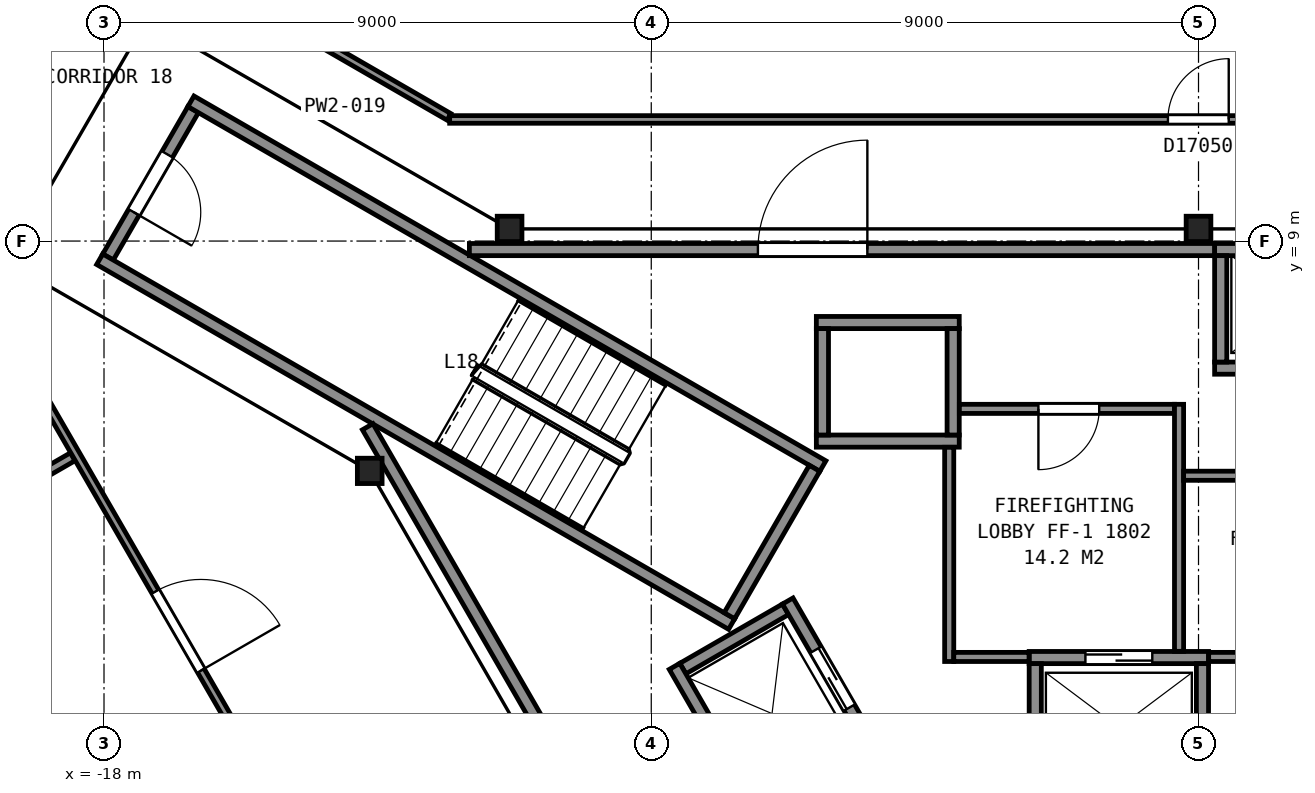
"""IFC4 building model, lengths in metres.
Left out: names, types, materials, properties, quantities, classifications, styles, units other than length and angle.
Written with IfcOpenShell. Run it as: python <this file> out.ifc"""

import sys

from ifc_helpers import new_model, si_unit, direction, frame, frame_2d, origin, origin_2d, place, context, subcontext, project, spatial, rectangle, i_section, extrude, element, fill, save


model = new_model("IFC4")
c1 = context("Model", 3, precision=1e-05, world=origin(), true_north=direction((0.0, 1.0)))
c2 = subcontext(c1, "Body", "Model", "MODEL_VIEW")
j1 = project(units=[si_unit("LENGTHUNIT", "METRE"), si_unit("PLANEANGLEUNIT", "RADIAN")], contexts=[c1])
p1 = place(None, origin())
s1 = spatial("IfcSite", under=j1, at=p1, CompositionType="ELEMENT")
p2 = place(p1, origin())
s2 = spatial("IfcBuilding", under=s1, at=p2, CompositionType="ELEMENT")
p3 = place(p2, frame((0.0, 0.0, 80.0)))
s3 = spatial("IfcBuildingStorey", under=s2, at=p3, CompositionType="ELEMENT", Elevation=80.0)
for number, where, z_axis, x_axis in (
    (1, (0.0, 9.2, 0.0), (0.0, 0.0, 1.0), (1.0, 0.0, 0.0)),
    (2, (-11.33, 9.2, 0.0), (0.0, 0.0, 1.0), (1.0, 0.0, 0.0)),
    (3, (-13.63, 5.22, 0.0), (0.0, 0.0, 1.0), (1.0, 0.0, 0.0)),
):
    element("IfcColumn", number, at=place(p3, frame(where, z_axis=z_axis, x_axis=x_axis)), inside=s3, PredefinedType="COLUMN", context=c2, shape_type="SweptSolid", body=[
        extrude(i_section(OverallWidth=0.406, OverallDepth=0.417, WebThickness=0.03, FlangeThickness=0.048, FilletRadius=0.015, at=origin_2d()), origin(), (0.0, 0.0, 1.0), 3.6),
    ])
p4 = place(p3, frame((-16.534, 11.162, 0.0), z_axis=(0.0, 0.0, 1.0), x_axis=(-0.49998411664, -0.866034573852, 0.0)))
e4 = element("IfcWall", 4, at=p4, inside=s3, PredefinedType="PARTITIONING", context=c2, shape_type="SweptSolid", body=[
    extrude(rectangle(XDim=2.8, YDim=0.2, at=frame_2d((1.4, 0.0))), origin(), (0.0, 0.0, 1.0), 3.35),
])
p5 = place(p4, frame((0.85, 0.0, 0.0)))
e5 = element("IfcOpeningElement", 5, at=p5, cuts=e4, PredefinedType="OPENING", context=c2, shape_type="SweptSolid", body=[
    extrude(rectangle(XDim=1.1, YDim=2.1, at=frame_2d((0.55, 1.05))), frame((0.0, 0.11, 0.0), z_axis=(0.0, -1.0, 0.0), x_axis=(1.0, 0.0, 0.0)), (0.0, 0.0, 1.0), 0.22),
])
for number, where, z_axis, x_axis in (
    (6, (-7.678, 2.701, 0.0), (0.0, 0.0, 1.0), (-0.866, 0.5, 0.0)),
    (7, (-6.178, 5.299, 0.0), (0.0, 0.0, 1.0), (-0.866, 0.5, 0.0)),
):
    element("IfcWall", number, at=place(p3, frame(where, z_axis=z_axis, x_axis=x_axis)), inside=s3, PredefinedType="PARTITIONING", context=c2, shape_type="SweptSolid", body=[
        extrude(rectangle(XDim=12.0, YDim=0.2, at=frame_2d((6.0, 0.0))), origin(), (0.0, 0.0, 1.0), 3.35),
    ])
p6 = place(p3, frame((-6.315, 5.262, 0.0), z_axis=(0.0, 0.0, 1.0), x_axis=(-0.500049511043, -0.865996816683, 0.0)))
e8 = element("IfcWall", 8, at=p6, inside=s3, PredefinedType="PARTITIONING", context=c2, shape_type="SweptSolid", body=[
    extrude(rectangle(XDim=2.8, YDim=0.2, at=frame_2d((1.4, 0.0))), origin(), (0.0, 0.0, 1.0), 3.35),
])
p7 = place(p3, frame((-2.785, 2.15, 0.0), z_axis=(0.0, 0.0, 1.0), x_axis=(1.0, 0.0, 0.0)))
e9 = element("IfcWall", 9, at=p7, inside=s3, PredefinedType="PARTITIONING", context=c2, shape_type="SweptSolid", body=[
    extrude(rectangle(XDim=2.95, YDim=0.2, at=frame_2d((1.475, 0.0))), origin(), (0.0, 0.0, 1.0), 3.6),
])
p8 = place(p7, frame((0.925, 0.0, 0.0)))
e10 = element("IfcOpeningElement", 10, at=p8, cuts=e9, PredefinedType="OPENING", context=c2, shape_type="SweptSolid", body=[
    extrude(rectangle(XDim=1.1, YDim=2.1, at=frame_2d((0.55, 1.05))), frame((0.0, 0.11, 0.0), z_axis=(0.0, -1.0, 0.0), x_axis=(1.0, 0.0, 0.0)), (0.0, 0.0, 1.0), 0.22),
])
p9 = place(p3, frame((-6.285, 5.71, 0.0), z_axis=(0.0, 0.0, 1.0), x_axis=(1.0, 0.0, 0.0)))
e11 = element("IfcWall", 11, at=p9, inside=s3, PredefinedType="PARTITIONING", context=c2, shape_type="SweptSolid", body=[
    extrude(rectangle(XDim=2.35, YDim=0.2, at=frame_2d((1.175, 0.0))), origin(), (0.0, 0.0, 1.0), 3.6),
])
p10 = place(p3, frame((0.265, 6.91, 0.0), z_axis=(0.0, 0.0, 1.0), x_axis=(1.0, 0.0, 0.0)))
e12 = element("IfcWall", 12, at=p10, inside=s3, PredefinedType="PARTITIONING", context=c2, shape_type="SweptSolid", body=[
    extrude(rectangle(XDim=2.55, YDim=0.2, at=frame_2d((1.275, 0.0))), origin(), (0.0, 0.0, 1.0), 3.6),
])
p11 = place(p10, frame((0.725, 0.0, 0.0)))
e13 = element("IfcOpeningElement", 13, at=p11, cuts=e12, PredefinedType="OPENING", context=c2, shape_type="SweptSolid", body=[
    extrude(rectangle(XDim=1.1, YDim=2.1, at=frame_2d((0.55, 1.05))), frame((0.0, 0.11, 0.0), z_axis=(0.0, -1.0, 0.0), x_axis=(1.0, 0.0, 0.0)), (0.0, 0.0, 1.0), 0.22),
])
p12 = place(p3, frame((-6.285, 7.66, 0.0), z_axis=(0.0, 0.0, 1.0), x_axis=(1.0, 0.0, 0.0)))
e14 = element("IfcWall", 14, at=p12, inside=s3, PredefinedType="PARTITIONING", context=c2, shape_type="SweptSolid", body=[
    extrude(rectangle(XDim=2.35, YDim=0.2, at=frame_2d((1.175, 0.0))), origin(), (0.0, 0.0, 1.0), 3.6),
])
p13 = place(p3, frame((0.265, 8.86, 0.0), z_axis=(0.0, 0.0, 1.0), x_axis=(1.0, 0.0, 0.0)))
e15 = element("IfcWall", 15, at=p13, inside=s3, PredefinedType="PARTITIONING", context=c2, shape_type="SweptSolid", body=[
    extrude(rectangle(XDim=2.55, YDim=0.2, at=frame_2d((1.275, 0.0))), origin(), (0.0, 0.0, 1.0), 3.6),
])
p14 = place(p3, frame((-8.48, 1.969, 0.0), z_axis=(0.0, 0.0, 1.0), x_axis=(0.866000020948, 0.500043961785, 0.0)))
e16 = element("IfcWall", 16, at=p14, inside=s3, PredefinedType="PARTITIONING", context=c2, shape_type="SweptSolid", body=[
    extrude(rectangle(XDim=1.95, YDim=0.2, at=frame_2d((0.975, 0.0))), origin(), (0.0, 0.0, 1.0), 3.6),
])
p15 = place(p3, frame((0.365, 7.01, 0.0), z_axis=(0.0, 0.0, 1.0), x_axis=(0.0, 1.0, 0.0)))
e17 = element("IfcWall", 17, at=p15, inside=s3, PredefinedType="PARTITIONING", context=c2, shape_type="SweptSolid", body=[
    extrude(rectangle(XDim=1.75, YDim=0.2, at=frame_2d((0.875, 0.0))), origin(), (0.0, 0.0, 1.0), 3.6),
])
for number, where, z_axis, x_axis in (
    (18, (0.065, 0.1, 0.0), (0.0, 0.0, 1.0), (0.0, 1.0, 0.0)),
    (19, (-2.685, 0.1, 0.0), (0.0, 0.0, 1.0), (0.0, 1.0, 0.0)),
):
    element("IfcWall", number, at=place(p3, frame(where, z_axis=z_axis, x_axis=x_axis)), inside=s3, PredefinedType="PARTITIONING", context=c2, shape_type="SweptSolid", body=[
        extrude(rectangle(XDim=1.95, YDim=0.2, at=frame_2d((0.975, 0.0))), origin(), (0.0, 0.0, 1.0), 3.6),
    ])
for number, where, z_axis, x_axis in (
    (20, (-4.035, 5.81, 0.0), (0.0, 0.0, 1.0), (0.0, 1.0, 0.0)),
    (21, (-6.185, 5.81, 0.0), (0.0, 0.0, 1.0), (0.0, 1.0, 0.0)),
):
    element("IfcWall", number, at=place(p3, frame(where, z_axis=z_axis, x_axis=x_axis)), inside=s3, PredefinedType="PARTITIONING", context=c2, shape_type="SweptSolid", body=[
        extrude(rectangle(XDim=1.75, YDim=0.2, at=frame_2d((0.875, 0.0))), origin(), (0.0, 0.0, 1.0), 3.6),
    ])
p16 = place(p3, frame((-5.28, 0.525, 0.0), z_axis=(0.0, 0.0, 1.0), x_axis=(-0.500037662692, 0.866003658127, 0.0)))
e22 = element("IfcWall", 22, at=p16, inside=s3, PredefinedType="PARTITIONING", context=c2, shape_type="SweptSolid", body=[
    extrude(rectangle(XDim=2.95, YDim=0.2, at=frame_2d((1.475, 0.0))), origin(), (0.0, 0.0, 1.0), 3.6),
])
p17 = place(p16, frame((0.925, 0.0, 0.0)))
e23 = element("IfcOpeningElement", 23, at=p17, cuts=e22, PredefinedType="OPENING", context=c2, shape_type="SweptSolid", body=[
    extrude(rectangle(XDim=1.1, YDim=2.1, at=frame_2d((0.55, 1.05))), frame((0.0, 0.11, 0.0), z_axis=(0.0, -1.0, 0.0), x_axis=(1.0, 0.0, 0.0)), (0.0, 0.0, 1.0), 0.22),
])
p18 = place(p3, frame((-7.242, -0.376, 0.0), z_axis=(0.0, 0.0, 1.0), x_axis=(-0.499996545922, 0.866027397988, 0.0)))
e24 = element("IfcWall", 24, at=p18, inside=s3, PredefinedType="PARTITIONING", context=c2, shape_type="SweptSolid", body=[
    extrude(rectangle(XDim=2.75, YDim=0.2, at=frame_2d((1.375, 0.0))), origin(), (0.0, 0.0, 1.0), 3.6),
])
p19 = place(p3, frame((-13.664, 5.946, 0.0), z_axis=(0.0, 0.0, 1.0), x_axis=(0.499994327219, -0.866028678941, 0.0)))
e25 = element("IfcWall", 25, at=p19, inside=s3, PredefinedType="PARTITIONING", context=c2, shape_type="SweptSolid", body=[
    extrude(rectangle(XDim=23.968, YDim=0.2, at=frame_2d((11.984, 0.0))), origin(), (0.0, 0.0, 1.0), 3.35),
])
p20 = place(p3, frame((0.263, 8.86, 0.0), z_axis=(0.0, 0.0, 1.0), x_axis=(-1.0, 0.0, 0.0)))
e26 = element("IfcWall", 26, at=p20, inside=s3, PredefinedType="PARTITIONING", context=c2, shape_type="SweptSolid", body=[
    extrude(rectangle(XDim=12.254, YDim=0.2, at=frame_2d((6.127, 0.0))), origin(), (0.0, 0.0, 1.0), 3.35),
])
p21 = place(p20, frame((5.709, 0.0, 0.0)))
e27 = element("IfcOpeningElement", 27, at=p21, cuts=e26, PredefinedType="OPENING", context=c2, shape_type="SweptSolid", body=[
    extrude(rectangle(XDim=1.8, YDim=2.1, at=frame_2d((0.9, 1.05))), frame((0.0, 0.11, 0.0), z_axis=(0.0, -1.0, 0.0), x_axis=(1.0, 0.0, 0.0)), (0.0, 0.0, 1.0), 0.22),
])
p22 = place(p3, frame((-4.1, 2.085, 0.0), z_axis=(0.0, 0.0, 1.0), x_axis=(0.0, 1.0, 0.0)))
e28 = element("IfcWall", 28, at=p22, inside=s3, PredefinedType="PARTITIONING", context=c2, shape_type="SweptSolid", body=[
    extrude(rectangle(XDim=3.523, YDim=0.15, at=frame_2d((1.761, 0.0))), origin(), (0.0, 0.0, 1.0), 3.35),
])
p23 = place(p3, frame((-4.025, 2.16, 0.0), z_axis=(0.0, 0.0, 1.0), x_axis=(1.0, 0.0, 0.0)))
e29 = element("IfcWall", 29, at=p23, inside=s3, PredefinedType="PARTITIONING", context=c2, shape_type="SweptSolid", body=[
    extrude(rectangle(XDim=1.238, YDim=0.15, at=frame_2d((0.619, 0.0))), origin(), (0.0, 0.0, 1.0), 3.35),
])
p24 = place(p3, frame((-3.933, 6.24, 0.0), z_axis=(0.0, 0.0, 1.0), x_axis=(1.0, 0.0, 0.0)))
e30 = element("IfcWall", 30, at=p24, inside=s3, PredefinedType="PARTITIONING", context=c2, shape_type="SweptSolid", body=[
    extrude(rectangle(XDim=3.538, YDim=0.15, at=frame_2d((1.769, 0.0))), origin(), (0.0, 0.0, 1.0), 3.35),
])
p25 = place(p24, frame((1.3, 0.0, 0.0)))
e31 = element("IfcOpeningElement", 31, at=p25, cuts=e30, PredefinedType="OPENING", context=c2, shape_type="SweptSolid", body=[
    extrude(rectangle(XDim=1.0, YDim=2.1, at=frame_2d((0.5, 1.05))), frame((0.0, 0.085, 0.0), z_axis=(0.0, -1.0, 0.0), x_axis=(1.0, 0.0, 0.0)), (0.0, 0.0, 1.0), 0.17),
])
p26 = place(p3, frame((-0.32, 2.252, 0.0), z_axis=(0.0, 0.0, 1.0), x_axis=(0.0, 1.0, 0.0)))
e32 = element("IfcWall", 32, at=p26, inside=s3, PredefinedType="PARTITIONING", context=c2, shape_type="SweptSolid", body=[
    extrude(rectangle(XDim=4.063, YDim=0.15, at=frame_2d((2.031, 0.0))), origin(), (0.0, 0.0, 1.0), 3.35),
])
p27 = place(p3, frame((-0.245, 5.14, 0.0), z_axis=(0.0, 0.0, 1.0), x_axis=(1.0, 0.0, 0.0)))
e33 = element("IfcWall", 33, at=p27, inside=s3, PredefinedType="PARTITIONING", context=c2, shape_type="SweptSolid", body=[
    extrude(rectangle(XDim=5.11, YDim=0.15, at=frame_2d((2.555, 0.0))), origin(), (0.0, 0.0, 1.0), 3.35),
])
p28 = place(p27, frame((1.975, 0.0, 0.0)))
e34 = element("IfcOpeningElement", 34, at=p28, cuts=e33, PredefinedType="OPENING", context=c2, shape_type="SweptSolid", body=[
    extrude(rectangle(XDim=1.0, YDim=2.1, at=frame_2d((0.5, 1.05))), frame((0.0, 0.085, 0.0), z_axis=(0.0, -1.0, 0.0), x_axis=(1.0, 0.0, 0.0)), (0.0, 0.0, 1.0), 0.17),
])
p29 = place(p3, frame((0.167, 2.16, 0.0), z_axis=(0.0, 0.0, 1.0), x_axis=(1.0, 0.0, 0.0)))
e35 = element("IfcWall", 35, at=p29, inside=s3, PredefinedType="PARTITIONING", context=c2, shape_type="SweptSolid", body=[
    extrude(rectangle(XDim=1.356, YDim=0.15, at=frame_2d((0.678, 0.0))), origin(), (0.0, 0.0, 1.0), 3.35),
])
p30 = place(p3, frame((-25.432, 1.459, 0.0), z_axis=(0.0, 0.0, 1.0), x_axis=(0.866052736899, 0.499952654668, 0.0)))
e36 = element("IfcWall", 36, at=p30, inside=s3, PredefinedType="PARTITIONING", context=c2, shape_type="SweptSolid", body=[
    extrude(rectangle(XDim=7.987, YDim=0.15, at=frame_2d((3.994, 0.0))), origin(), (0.0, 0.0, 1.0), 2.613),
])
p31 = place(p3, frame((-3.766, -19.958, 0.0), z_axis=(0.0, 0.0, 1.0), x_axis=(-0.50002170027, 0.866012874765, 0.0)))
e37 = element("IfcWall", 37, at=p31, inside=s3, PredefinedType="PARTITIONING", context=c2, shape_type="SweptSolid", body=[
    extrude(rectangle(XDim=31.379, YDim=0.125, at=frame_2d((15.69, 0.0))), origin(), (0.0, 0.0, 1.0), 2.613),
])
p32 = place(p31, frame((25.28, 0.0, 0.0)))
e38 = element("IfcOpeningElement", 38, at=p32, cuts=e37, PredefinedType="OPENING", context=c2, shape_type="SweptSolid", body=[
    extrude(rectangle(XDim=1.5, YDim=2.1, at=frame_2d((0.75, 1.05))), frame((0.0, 0.073, 0.0), z_axis=(0.0, -1.0, 0.0), x_axis=(1.0, 0.0, 0.0)), (0.0, 0.0, 1.0), 0.145),
])
p33 = place(p31, frame((21.124, 0.0, 0.0)))
e39 = element("IfcOpeningElement", 39, at=p33, cuts=e37, PredefinedType="OPENING", context=c2, shape_type="SweptSolid", body=[
    extrude(rectangle(XDim=0.9, YDim=2.1, at=frame_2d((0.45, 1.05))), frame((0.0, 0.073, 0.0), z_axis=(0.0, -1.0, 0.0), x_axis=(1.0, 0.0, 0.0)), (0.0, 0.0, 1.0), 0.145),
])
p34 = place(p31, frame((14.349, 0.0, 0.0)))
e40 = element("IfcOpeningElement", 40, at=p34, cuts=e37, PredefinedType="OPENING", context=c2, shape_type="SweptSolid", body=[
    extrude(rectangle(XDim=0.9, YDim=2.1, at=frame_2d((0.45, 1.05))), frame((0.0, 0.073, 0.0), z_axis=(0.0, -1.0, 0.0), x_axis=(1.0, 0.0, 0.0)), (0.0, 0.0, 1.0), 0.145),
])
p35 = place(p31, frame((11.804, 0.0, 0.0)))
e41 = element("IfcOpeningElement", 41, at=p35, cuts=e37, PredefinedType="OPENING", context=c2, shape_type="SweptSolid", body=[
    extrude(rectangle(XDim=0.9, YDim=2.1, at=frame_2d((0.45, 1.05))), frame((0.0, 0.073, 0.0), z_axis=(0.0, -1.0, 0.0), x_axis=(1.0, 0.0, 0.0)), (0.0, 0.0, 1.0), 0.145),
])
p36 = place(p31, frame((5.33, 0.0, 0.0)))
e42 = element("IfcOpeningElement", 42, at=p36, cuts=e37, PredefinedType="OPENING", context=c2, shape_type="SweptSolid", body=[
    extrude(rectangle(XDim=0.9, YDim=2.1, at=frame_2d((0.45, 1.05))), frame((0.0, 0.073, 0.0), z_axis=(0.0, -1.0, 0.0), x_axis=(1.0, 0.0, 0.0)), (0.0, 0.0, 1.0), 0.145),
])
p37 = place(p31, frame((2.906, 0.0, 0.0)))
e43 = element("IfcOpeningElement", 43, at=p37, cuts=e37, PredefinedType="OPENING", context=c2, shape_type="SweptSolid", body=[
    extrude(rectangle(XDim=1.0, YDim=2.1, at=frame_2d((0.5, 1.05))), frame((0.0, 0.073, 0.0), z_axis=(0.0, -1.0, 0.0), x_axis=(1.0, 0.0, 0.0)), (0.0, 0.0, 1.0), 0.145),
])
p38 = place(p3, frame((-14.37, 12.222, 0.0), z_axis=(0.0, 0.0, 1.0), x_axis=(0.866063239147, -0.499934461503, 0.0)))
e44 = element("IfcWall", 44, at=p38, inside=s3, PredefinedType="PARTITIONING", context=c2, shape_type="SweptSolid", body=[
    extrude(rectangle(XDim=2.359, YDim=0.125, at=frame_2d((1.18, 0.0))), origin(), (0.0, 0.0, 1.0), 2.613),
])
p39 = place(p3, frame((-12.315, 11.0, 0.0), z_axis=(0.0, 0.0, 1.0), x_axis=(1.0, 0.0, 0.0)))
e45 = element("IfcWall", 45, at=p39, inside=s3, PredefinedType="PARTITIONING", context=c2, shape_type="SweptSolid", body=[
    extrude(rectangle(XDim=24.631, YDim=0.125, at=frame_2d((12.315, 0.0))), origin(), (0.0, 0.0, 1.0), 2.613),
])
p40 = place(p39, frame((11.812, 0.0, 0.0)))
e46 = element("IfcOpeningElement", 46, at=p40, cuts=e45, PredefinedType="OPENING", context=c2, shape_type="SweptSolid", body=[
    extrude(rectangle(XDim=1.0, YDim=2.1, at=frame_2d((0.5, 1.05))), frame((0.0, 0.073, 0.0), z_axis=(0.0, -1.0, 0.0), x_axis=(1.0, 0.0, 0.0)), (0.0, 0.0, 1.0), 0.145),
])
p41 = place(p5, origin())
e47 = element("IfcDoor", 47, at=p41, inside=s3, OperationType="SINGLE_SWING_RIGHT", PredefinedType="DOOR", context=c2, shape_type="SweptSolid", body=[
    extrude(rectangle(XDim=1.1, YDim=2.1, at=frame_2d((0.55, 1.05))), frame((0.0, 0.025, 0.0), z_axis=(0.0, -1.0, 0.0), x_axis=(1.0, 0.0, 0.0)), (0.0, 0.0, 1.0), 0.05),
])
fill(e5, e47)
p42 = place(p8, origin())
e48 = element("IfcDoor", 48, at=p42, inside=s3, OperationType="SLIDING_TO_LEFT", PredefinedType="DOOR", context=c2, shape_type="SweptSolid", body=[
    extrude(rectangle(XDim=1.1, YDim=2.1, at=frame_2d((0.55, 1.05))), frame((0.0, 0.025, 0.0), z_axis=(0.0, -1.0, 0.0), x_axis=(1.0, 0.0, 0.0)), (0.0, 0.0, 1.0), 0.05),
])
fill(e10, e48)
p43 = place(p17, origin())
e49 = element("IfcDoor", 49, at=p43, inside=s3, OperationType="SLIDING_TO_LEFT", PredefinedType="DOOR", context=c2, shape_type="SweptSolid", body=[
    extrude(rectangle(XDim=1.1, YDim=2.1, at=frame_2d((0.55, 1.05))), frame((0.0, 0.025, 0.0), z_axis=(0.0, -1.0, 0.0), x_axis=(1.0, 0.0, 0.0)), (0.0, 0.0, 1.0), 0.05),
])
fill(e23, e49)
p44 = place(p21, origin())
e50 = element("IfcDoor", 50, at=p44, inside=s3, OperationType="DOUBLE_DOOR_SINGLE_SWING", PredefinedType="DOOR", context=c2, shape_type="SweptSolid", body=[
    extrude(rectangle(XDim=1.8, YDim=2.1, at=frame_2d((0.9, 1.05))), frame((0.0, 0.025, 0.0), z_axis=(0.0, -1.0, 0.0), x_axis=(1.0, 0.0, 0.0)), (0.0, 0.0, 1.0), 0.05),
])
fill(e27, e50)
p45 = place(p25, origin())
e51 = element("IfcDoor", 51, at=p45, inside=s3, OperationType="SINGLE_SWING_LEFT", PredefinedType="DOOR", context=c2, shape_type="SweptSolid", body=[
    extrude(rectangle(XDim=1.0, YDim=2.1, at=frame_2d((0.5, 1.05))), frame((0.0, 0.025, 0.0), z_axis=(0.0, -1.0, 0.0), x_axis=(1.0, 0.0, 0.0)), (0.0, 0.0, 1.0), 0.05),
])
fill(e31, e51)
p46 = place(p32, origin())
e52 = element("IfcDoor", 52, at=p46, inside=s3, OperationType="DOUBLE_DOOR_SINGLE_SWING", PredefinedType="DOOR", context=c2, shape_type="SweptSolid", body=[
    extrude(rectangle(XDim=1.5, YDim=2.1, at=frame_2d((0.75, 1.05))), frame((0.0, 0.025, 0.0), z_axis=(0.0, -1.0, 0.0), x_axis=(1.0, 0.0, 0.0)), (0.0, 0.0, 1.0), 0.05),
])
fill(e38, e52)
p47 = place(p40, origin())
e53 = element("IfcDoor", 53, at=p47, inside=s3, OperationType="SINGLE_SWING_RIGHT", PredefinedType="DOOR", context=c2, shape_type="SweptSolid", body=[
    extrude(rectangle(XDim=1.0, YDim=2.1, at=frame_2d((0.5, 1.05))), frame((0.0, 0.025, 0.0), z_axis=(0.0, -1.0, 0.0), x_axis=(1.0, 0.0, 0.0)), (0.0, 0.0, 1.0), 0.05),
])
fill(e46, e53)
save(model, sys.argv[1])
